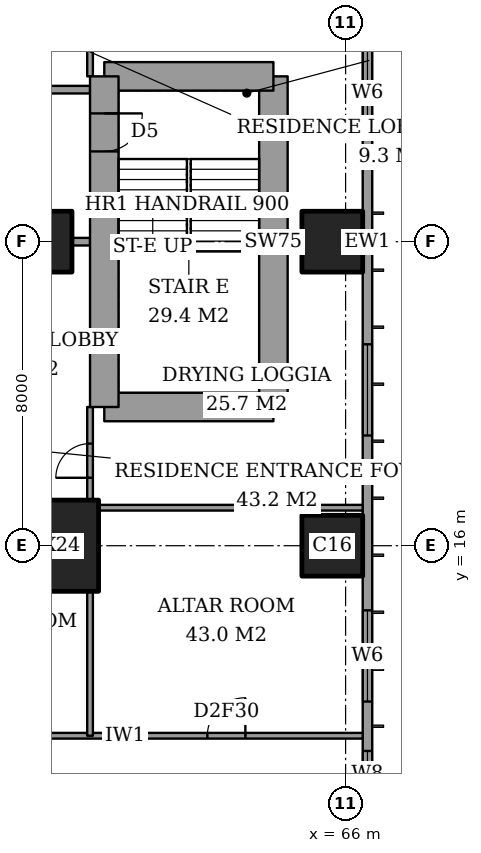
"""IFC4 building model, lengths in metres.
Left out: names, types, materials, properties, quantities, classifications, styles, units other than length and angle.
Written with IfcOpenShell. Run it as: python <this file> out.ifc"""

import sys

from ifc_helpers import new_model, si_unit, direction, frame, frame_2d, origin, origin_2d, place, context, subcontext, project, spatial, rectangle, extrude, element, fill, save


model = new_model("IFC4")
c1 = context("Model", 3, precision=1e-05, world=origin(), true_north=direction((0.0, 1.0)))
c2 = subcontext(c1, "Body", "Model", "MODEL_VIEW")
j1 = project(units=[si_unit("LENGTHUNIT", "METRE"), si_unit("PLANEANGLEUNIT", "RADIAN")], contexts=[c1])
p1 = place(None, origin())
s1 = spatial("IfcSite", under=j1, at=p1, CompositionType="ELEMENT")
p2 = place(p1, origin())
s2 = spatial("IfcBuilding", under=s1, at=p2, CompositionType="ELEMENT")
p3 = place(p2, frame((0.0, 0.0, 237.6)))
s3 = spatial("IfcBuildingStorey", under=s2, at=p3, CompositionType="ELEMENT", Elevation=237.6)
p4 = place(p3, frame((58.0, 16.0, 0.0), z_axis=(0.0, 0.0, 1.0), x_axis=(1.0, 0.0, 0.0)))
e1 = element("IfcColumn", 1, at=p4, inside=s3, PredefinedType="COLUMN", context=c2, shape_type="SweptSolid", body=[
    extrude(rectangle(XDim=3.0, YDim=2.4, at=origin_2d()), origin(), (0.0, 0.0, 1.0), 3.6),
])
for number, where, z_axis, x_axis in (
    (2, (58.0, 24.0, 0.0), (0.0, 0.0, 1.0), (1.0, 0.0, 0.0)),
    (3, (65.65, 16.0, 0.0), (0.0, 0.0, 1.0), (1.0, 0.0, 0.0)),
    (4, (65.65, 24.0, 0.0), (0.0, 0.0, 1.0), (1.0, 0.0, 0.0)),
):
    element("IfcColumn", number, at=place(p3, frame(where, z_axis=z_axis, x_axis=x_axis)), inside=s3, PredefinedType="COLUMN", context=c2, shape_type="SweptSolid", body=[
        extrude(rectangle(XDim=1.6, YDim=1.6, at=origin_2d()), origin(), (0.0, 0.0, 1.0), 3.6),
    ])
p5 = place(p3, frame((59.65, 19.65, 0.0), z_axis=(0.0, 0.0, 1.0), x_axis=(1.0, 0.0, 0.0)))
e5 = element("IfcWall", 5, at=p5, inside=s3, PredefinedType="SHEAR", context=c2, shape_type="SweptSolid", body=[
    extrude(rectangle(XDim=4.45, YDim=0.75, at=frame_2d((2.225, 0.0))), origin(), (0.0, 0.0, 1.0), 3.6),
])
p6 = place(p3, frame((64.1, 19.65, 0.0), z_axis=(0.0, 0.0, 1.0), x_axis=(0.0, 1.0, 0.0)))
e6 = element("IfcWall", 6, at=p6, inside=s3, PredefinedType="SHEAR", context=c2, shape_type="SweptSolid", body=[
    extrude(rectangle(XDim=8.7, YDim=0.75, at=frame_2d((4.35, 0.0))), origin(), (0.0, 0.0, 1.0), 3.6),
])
p7 = place(p3, frame((64.1, 28.35, 0.0), z_axis=(0.0, 0.0, 1.0), x_axis=(-1.0, 0.0, 0.0)))
e7 = element("IfcWall", 7, at=p7, inside=s3, PredefinedType="SHEAR", context=c2, shape_type="SweptSolid", body=[
    extrude(rectangle(XDim=4.45, YDim=0.75, at=frame_2d((2.225, 0.0))), origin(), (0.0, 0.0, 1.0), 3.6),
])
p8 = place(p3, frame((59.65, 28.35, 0.0), z_axis=(0.0, 0.0, 1.0), x_axis=(0.0, -1.0, 0.0)))
e8 = element("IfcWall", 8, at=p8, inside=s3, PredefinedType="SHEAR", context=c2, shape_type="SweptSolid", body=[
    extrude(rectangle(XDim=8.7, YDim=0.75, at=frame_2d((4.35, 0.0))), origin(), (0.0, 0.0, 1.0), 3.6),
])
p9 = place(p8, frame((0.975, 0.0, 0.0)))
e9 = element("IfcOpeningElement", 9, at=p9, cuts=e8, PredefinedType="OPENING", context=c2, shape_type="SweptSolid", body=[
    extrude(rectangle(XDim=1.0, YDim=2.1, at=frame_2d((0.5, 1.05))), frame((0.0, 0.385, 0.0), z_axis=(0.0, -1.0, 0.0), x_axis=(1.0, 0.0, 0.0)), (0.0, 0.0, 1.0), 0.77),
])
p10 = place(p3, frame((66.575, 3.175, 0.0), z_axis=(0.0, 0.0, 1.0), x_axis=(0.0, 1.0, 0.0)))
e10 = element("IfcWall", 10, at=p10, inside=s3, PredefinedType="SOLIDWALL", context=c2, shape_type="SweptSolid", body=[
    extrude(rectangle(XDim=41.65, YDim=0.25, at=frame_2d((20.825, 0.0))), origin(), (0.0, 0.0, 1.0), 3.6),
])
p11 = place(p10, frame((0.875, 0.0, 0.6)))
e11 = element("IfcOpeningElement", 11, at=p11, cuts=e10, PredefinedType="OPENING", context=c2, shape_type="SweptSolid", body=[
    extrude(rectangle(XDim=2.4, YDim=2.0, at=frame_2d((1.2, 1.0))), frame((0.0, 0.135, 0.0), z_axis=(0.0, -1.0, 0.0), x_axis=(1.0, 0.0, 0.0)), (0.0, 0.0, 1.0), 0.27),
])
p12 = place(p10, frame((6.225, 0.0, 0.6)))
e12 = element("IfcOpeningElement", 12, at=p12, cuts=e10, PredefinedType="OPENING", context=c2, shape_type="SweptSolid", body=[
    extrude(rectangle(XDim=1.2, YDim=2.0, at=frame_2d((0.6, 1.0))), frame((0.0, 0.135, 0.0), z_axis=(0.0, -1.0, 0.0), x_axis=(1.0, 0.0, 0.0)), (0.0, 0.0, 1.0), 0.27),
])
p13 = place(p10, frame((8.725, 0.0, 0.6)))
e13 = element("IfcOpeningElement", 13, at=p13, cuts=e10, PredefinedType="OPENING", context=c2, shape_type="SweptSolid", body=[
    extrude(rectangle(XDim=2.4, YDim=2.0, at=frame_2d((1.2, 1.0))), frame((0.0, 0.135, 0.0), z_axis=(0.0, -1.0, 0.0), x_axis=(1.0, 0.0, 0.0)), (0.0, 0.0, 1.0), 0.27),
])
p14 = place(p10, frame((15.725, 0.0, 0.6)))
e14 = element("IfcOpeningElement", 14, at=p14, cuts=e10, PredefinedType="OPENING", context=c2, shape_type="SweptSolid", body=[
    extrude(rectangle(XDim=2.4, YDim=2.0, at=frame_2d((1.2, 1.0))), frame((0.0, 0.135, 0.0), z_axis=(0.0, -1.0, 0.0), x_axis=(1.0, 0.0, 0.0)), (0.0, 0.0, 1.0), 0.27),
])
p15 = place(p10, frame((23.525, 0.0, 0.6)))
e15 = element("IfcOpeningElement", 15, at=p15, cuts=e10, PredefinedType="OPENING", context=c2, shape_type="SweptSolid", body=[
    extrude(rectangle(XDim=2.4, YDim=2.0, at=frame_2d((1.2, 1.0))), frame((0.0, 0.135, 0.0), z_axis=(0.0, -1.0, 0.0), x_axis=(1.0, 0.0, 0.0)), (0.0, 0.0, 1.0), 0.27),
])
p16 = place(p10, frame((30.725, 0.0, 0.6)))
e16 = element("IfcOpeningElement", 16, at=p16, cuts=e10, PredefinedType="OPENING", context=c2, shape_type="SweptSolid", body=[
    extrude(rectangle(XDim=2.4, YDim=2.0, at=frame_2d((1.2, 1.0))), frame((0.0, 0.135, 0.0), z_axis=(0.0, -1.0, 0.0), x_axis=(1.0, 0.0, 0.0)), (0.0, 0.0, 1.0), 0.27),
])
p17 = place(p10, frame((34.525, 0.0, 0.6)))
e17 = element("IfcOpeningElement", 17, at=p17, cuts=e10, PredefinedType="OPENING", context=c2, shape_type="SweptSolid", body=[
    extrude(rectangle(XDim=1.2, YDim=2.0, at=frame_2d((0.6, 1.0))), frame((0.0, 0.135, 0.0), z_axis=(0.0, -1.0, 0.0), x_axis=(1.0, 0.0, 0.0)), (0.0, 0.0, 1.0), 0.27),
])
p18 = place(p10, frame((38.375, 0.0, 0.6)))
e18 = element("IfcOpeningElement", 18, at=p18, cuts=e10, PredefinedType="OPENING", context=c2, shape_type="SweptSolid", body=[
    extrude(rectangle(XDim=2.4, YDim=2.0, at=frame_2d((1.2, 1.0))), frame((0.0, 0.135, 0.0), z_axis=(0.0, -1.0, 0.0), x_axis=(1.0, 0.0, 0.0)), (0.0, 0.0, 1.0), 0.27),
])
p19 = place(p3, frame((41.439, 11.0, 0.0), z_axis=(0.0, 0.0, 1.0), x_axis=(1.0, 0.0, 0.0)))
e19 = element("IfcWall", 19, at=p19, inside=s3, PredefinedType="PARTITIONING", context=c2, shape_type="SweptSolid", body=[
    extrude(rectangle(XDim=25.011, YDim=0.15, at=frame_2d((12.505, 0.0))), origin(), (0.0, 0.0, 1.0), 3.35),
])
p20 = place(p19, frame((12.361, 0.0, 0.0)))
e20 = element("IfcOpeningElement", 20, at=p20, cuts=e19, PredefinedType="OPENING", context=c2, shape_type="SweptSolid", body=[
    extrude(rectangle(XDim=1.0, YDim=2.1, at=frame_2d((0.5, 1.05))), frame((0.0, 0.085, 0.0), z_axis=(0.0, -1.0, 0.0), x_axis=(1.0, 0.0, 0.0)), (0.0, 0.0, 1.0), 0.17),
])
p21 = place(p19, frame((20.924, 0.0, 0.0)))
e21 = element("IfcOpeningElement", 21, at=p21, cuts=e19, PredefinedType="OPENING", context=c2, shape_type="SweptSolid", body=[
    extrude(rectangle(XDim=1.0, YDim=2.1, at=frame_2d((0.5, 1.05))), frame((0.0, 0.085, 0.0), z_axis=(0.0, -1.0, 0.0), x_axis=(1.0, 0.0, 0.0)), (0.0, 0.0, 1.0), 0.17),
])
p22 = place(p19, frame((15.448, 0.0, 0.0)))
e22 = element("IfcOpeningElement", 22, at=p22, cuts=e19, PredefinedType="OPENING", context=c2, shape_type="SweptSolid", body=[
    extrude(rectangle(XDim=0.9, YDim=2.1, at=frame_2d((0.45, 1.05))), frame((0.0, 0.085, 0.0), z_axis=(0.0, -1.0, 0.0), x_axis=(1.0, 0.0, 0.0)), (0.0, 0.0, 1.0), 0.17),
])
p23 = place(p19, frame((9.961, 0.0, 0.0)))
e23 = element("IfcOpeningElement", 23, at=p23, cuts=e19, PredefinedType="OPENING", context=c2, shape_type="SweptSolid", body=[
    extrude(rectangle(XDim=1.0, YDim=2.1, at=frame_2d((0.5, 1.05))), frame((0.0, 0.085, 0.0), z_axis=(0.0, -1.0, 0.0), x_axis=(1.0, 0.0, 0.0)), (0.0, 0.0, 1.0), 0.17),
])
p24 = place(p19, frame((7.411, 0.0, 0.0)))
e24 = element("IfcOpeningElement", 24, at=p24, cuts=e19, PredefinedType="OPENING", context=c2, shape_type="SweptSolid", body=[
    extrude(rectangle(XDim=0.9, YDim=2.1, at=frame_2d((0.45, 1.05))), frame((0.0, 0.085, 0.0), z_axis=(0.0, -1.0, 0.0), x_axis=(1.0, 0.0, 0.0)), (0.0, 0.0, 1.0), 0.17),
])
p25 = place(p19, frame((2.836, 0.0, 0.0)))
e25 = element("IfcOpeningElement", 25, at=p25, cuts=e19, PredefinedType="OPENING", context=c2, shape_type="SweptSolid", body=[
    extrude(rectangle(XDim=1.0, YDim=2.1, at=frame_2d((0.5, 1.05))), frame((0.0, 0.085, 0.0), z_axis=(0.0, -1.0, 0.0), x_axis=(1.0, 0.0, 0.0)), (0.0, 0.0, 1.0), 0.17),
])
p26 = place(p3, frame((59.5, 17.0, 0.0), z_axis=(0.0, 0.0, 1.0), x_axis=(1.0, 0.0, 0.0)))
e26 = element("IfcWall", 26, at=p26, inside=s3, PredefinedType="PARTITIONING", context=c2, shape_type="SweptSolid", body=[
    extrude(rectangle(XDim=6.95, YDim=0.15, at=frame_2d((3.475, 0.0))), origin(), (0.0, 0.0, 1.0), 3.35),
])
p27 = place(p3, frame((58.8, 24.0, 0.0), z_axis=(0.0, 0.0, 1.0), x_axis=(1.0, 0.0, 0.0)))
e27 = element("IfcWall", 27, at=p27, inside=s3, PredefinedType="PARTITIONING", context=c2, shape_type="SweptSolid", body=[
    extrude(rectangle(XDim=0.475, YDim=0.2, at=frame_2d((0.237, 0.0))), origin(), (0.0, 0.0, 1.0), 3.35),
])
p28 = place(p3, frame((64.475, 24.0, 0.0), z_axis=(0.0, 0.0, 1.0), x_axis=(1.0, 0.0, 0.0)))
e28 = element("IfcWall", 28, at=p28, inside=s3, PredefinedType="PARTITIONING", context=c2, shape_type="SweptSolid", body=[
    extrude(rectangle(XDim=0.375, YDim=0.15, at=frame_2d((0.188, 0.0))), origin(), (0.0, 0.0, 1.0), 3.35),
])
p29 = place(p3, frame((42.0, 28.0, 0.0), z_axis=(0.0, 0.0, 1.0), x_axis=(1.0, 0.0, 0.0)))
e29 = element("IfcWall", 29, at=p29, inside=s3, PredefinedType="PARTITIONING", context=c2, shape_type="SweptSolid", body=[
    extrude(rectangle(XDim=17.275, YDim=0.2, at=frame_2d((8.637, 0.0))), origin(), (0.0, 0.0, 1.0), 3.35),
])
p30 = place(p29, frame((9.4, 0.0, 0.0)))
e30 = element("IfcOpeningElement", 30, at=p30, cuts=e29, PredefinedType="OPENING", context=c2, shape_type="SweptSolid", body=[
    extrude(rectangle(XDim=1.2, YDim=2.4, at=frame_2d((0.6, 1.2))), frame((0.0, 0.11, 0.0), z_axis=(0.0, -1.0, 0.0), x_axis=(1.0, 0.0, 0.0)), (0.0, 0.0, 1.0), 0.22),
])
p31 = place(p3, frame((59.275, 11.0, 0.0), z_axis=(0.0, 0.0, 1.0), x_axis=(0.0, 1.0, 0.0)))
e31 = element("IfcWall", 31, at=p31, inside=s3, PredefinedType="PARTITIONING", context=c2, shape_type="SweptSolid", body=[
    extrude(rectangle(XDim=3.8, YDim=0.15, at=frame_2d((1.9, 0.0))), origin(), (0.0, 0.0, 1.0), 3.35),
])
p32 = place(p3, frame((59.275, 17.2, 0.0), z_axis=(0.0, 0.0, 1.0), x_axis=(0.0, 1.0, 0.0)))
e32 = element("IfcWall", 32, at=p32, inside=s3, PredefinedType="PARTITIONING", context=c2, shape_type="SweptSolid", body=[
    extrude(rectangle(XDim=2.45, YDim=0.15, at=frame_2d((1.225, 0.0))), origin(), (0.0, 0.0, 1.0), 3.35),
])
p33 = place(p32, frame((0.587, 0.0, 0.0)))
e33 = element("IfcOpeningElement", 33, at=p33, cuts=e32, PredefinedType="OPENING", context=c2, shape_type="SweptSolid", body=[
    extrude(rectangle(XDim=0.9, YDim=2.1, at=frame_2d((0.45, 1.05))), frame((0.0, 0.085, 0.0), z_axis=(0.0, -1.0, 0.0), x_axis=(1.0, 0.0, 0.0)), (0.0, 0.0, 1.0), 0.17),
])
p34 = place(p3, frame((59.275, 28.35, 0.0), z_axis=(0.0, 0.0, 1.0), x_axis=(0.0, 1.0, 0.0)))
e34 = element("IfcWall", 34, at=p34, inside=s3, PredefinedType="PARTITIONING", context=c2, shape_type="SweptSolid", body=[
    extrude(rectangle(XDim=2.45, YDim=0.15, at=frame_2d((1.225, 0.0))), origin(), (0.0, 0.0, 1.0), 3.35),
])
p35 = place(p34, frame((0.962, 0.0, 0.0)))
e35 = element("IfcOpeningElement", 35, at=p35, cuts=e34, PredefinedType="OPENING", context=c2, shape_type="SweptSolid", body=[
    extrude(rectangle(XDim=0.9, YDim=2.1, at=frame_2d((0.45, 1.05))), frame((0.0, 0.085, 0.0), z_axis=(0.0, -1.0, 0.0), x_axis=(1.0, 0.0, 0.0)), (0.0, 0.0, 1.0), 0.17),
])
p36 = place(p12, origin())
e36 = element("IfcWindow", 36, at=p36, inside=s3, PartitioningType="SINGLE_PANEL", PredefinedType="WINDOW", context=c2, shape_type="SweptSolid", body=[
    extrude(rectangle(XDim=1.2, YDim=2.0, at=frame_2d((0.6, 1.0))), frame((0.0, 0.03, 0.0), z_axis=(0.0, -1.0, 0.0), x_axis=(1.0, 0.0, 0.0)), (0.0, 0.0, 1.0), 0.06),
])
fill(e12, e36)
p37 = place(p13, origin())
e37 = element("IfcWindow", 37, at=p37, inside=s3, PartitioningType="SINGLE_PANEL", PredefinedType="WINDOW", context=c2, shape_type="SweptSolid", body=[
    extrude(rectangle(XDim=2.4, YDim=2.0, at=frame_2d((1.2, 1.0))), frame((0.0, 0.03, 0.0), z_axis=(0.0, -1.0, 0.0), x_axis=(1.0, 0.0, 0.0)), (0.0, 0.0, 1.0), 0.06),
])
fill(e13, e37)
p38 = place(p14, origin())
e38 = element("IfcWindow", 38, at=p38, inside=s3, PartitioningType="SINGLE_PANEL", PredefinedType="WINDOW", context=c2, shape_type="SweptSolid", body=[
    extrude(rectangle(XDim=2.4, YDim=2.0, at=frame_2d((1.2, 1.0))), frame((0.0, 0.03, 0.0), z_axis=(0.0, -1.0, 0.0), x_axis=(1.0, 0.0, 0.0)), (0.0, 0.0, 1.0), 0.06),
])
fill(e14, e38)
p39 = place(p15, origin())
e39 = element("IfcWindow", 39, at=p39, inside=s3, PartitioningType="SINGLE_PANEL", PredefinedType="WINDOW", context=c2, shape_type="SweptSolid", body=[
    extrude(rectangle(XDim=2.4, YDim=2.0, at=frame_2d((1.2, 1.0))), frame((0.0, 0.03, 0.0), z_axis=(0.0, -1.0, 0.0), x_axis=(1.0, 0.0, 0.0)), (0.0, 0.0, 1.0), 0.06),
])
fill(e15, e39)
p40 = place(p21, origin())
e40 = element("IfcDoor", 40, at=p40, inside=s3, OperationType="SINGLE_SWING_LEFT", PredefinedType="DOOR", context=c2, shape_type="SweptSolid", body=[
    extrude(rectangle(XDim=1.0, YDim=2.1, at=frame_2d((0.5, 1.05))), frame((0.0, 0.025, 0.0), z_axis=(0.0, -1.0, 0.0), x_axis=(1.0, 0.0, 0.0)), (0.0, 0.0, 1.0), 0.05),
])
fill(e21, e40)
p41 = place(p33, origin())
e41 = element("IfcDoor", 41, at=p41, inside=s3, OperationType="SINGLE_SWING_RIGHT", PredefinedType="DOOR", context=c2, shape_type="SweptSolid", body=[
    extrude(rectangle(XDim=0.9, YDim=2.1, at=frame_2d((0.45, 1.05))), frame((0.0, 0.025, 0.0), z_axis=(0.0, -1.0, 0.0), x_axis=(1.0, 0.0, 0.0)), (0.0, 0.0, 1.0), 0.05),
])
fill(e33, e41)
p42 = place(p9, origin())
e42 = element("IfcDoor", 42, at=p42, inside=s3, OperationType="SINGLE_SWING_RIGHT", PredefinedType="DOOR", context=c2, shape_type="SweptSolid", body=[
    extrude(rectangle(XDim=1.0, YDim=2.1, at=frame_2d((0.5, 1.05))), frame((0.0, 0.025, 0.0), z_axis=(0.0, -1.0, 0.0), x_axis=(1.0, 0.0, 0.0)), (0.0, 0.0, 1.0), 0.05),
])
fill(e9, e42)
save(model, sys.argv[1])
